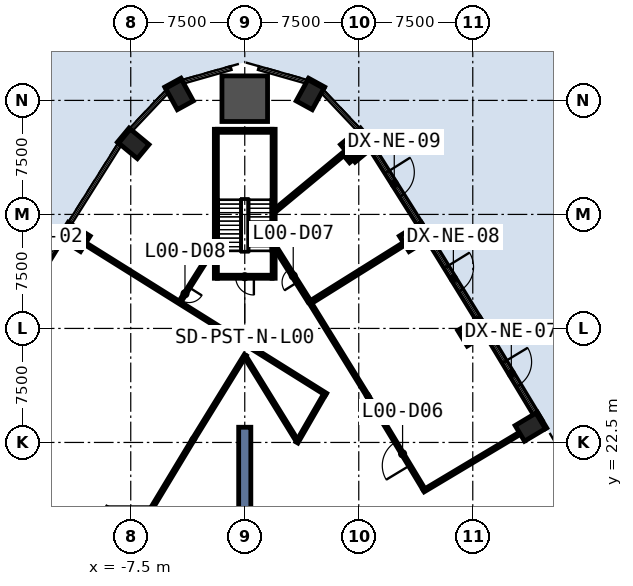
"""IFC4 building model, lengths in metres.
Left out: names, types, materials, properties, quantities, classifications, styles, units other than length and angle.
Written with IfcOpenShell. Run it as: python <this file> out.ifc"""

import sys

from ifc_helpers import new_model, si_unit, direction, frame, frame_2d, origin, origin_2d, place, context, subcontext, project, spatial, rectangle, extrude, element, fill, save


model = new_model("IFC4")
c1 = context("Model", 3, precision=1e-05, world=origin(), true_north=direction((0.0, 1.0)))
c2 = subcontext(c1, "Body", "Model", "MODEL_VIEW")
j1 = project(units=[si_unit("LENGTHUNIT", "METRE"), si_unit("PLANEANGLEUNIT", "RADIAN")], contexts=[c1])
p1 = place(None, origin())
s1 = spatial("IfcSite", under=j1, at=p1, CompositionType="ELEMENT")
p2 = place(p1, origin())
s2 = spatial("IfcBuilding", under=s1, at=p2, CompositionType="ELEMENT")
p3 = place(p2, origin())
s3 = spatial("IfcBuildingStorey", under=s2, at=p3, CompositionType="ELEMENT", Elevation=0.0)
for number, where, z_axis, x_axis in (
    (1, (18.782, 23.508, -0.5), (0.0, 0.0, 1.0), (-0.513, 0.858, 0.0)),
    (2, (15.005, 29.769, -0.5), (0.0, 0.0, 1.0), (-0.522, 0.853, 0.0)),
    (3, (11.167, 35.993, -0.5), (0.0, 0.0, 1.0), (-0.53, 0.848, 0.0)),
    (4, (7.299, 42.144, -0.5), (0.0, 0.0, 1.0), (-0.638, 0.77, 0.0)),
    (5, (4.297, 45.38, -0.5), (0.0, 0.0, 1.0), (-0.877, 0.48, 0.0)),
):
    element("IfcColumn", number, at=place(p3, frame(where, z_axis=z_axis, x_axis=x_axis)), inside=s3, PredefinedType="COLUMN", context=c2, shape_type="SweptSolid", body=[
        extrude(rectangle(XDim=1.2, YDim=1.6, at=origin_2d()), origin(), (0.0, 0.0, 1.0), 9.05),
    ])
p4 = place(p3, frame((0.0, 45.112, -0.5), z_axis=(0.0, 0.0, 1.0), x_axis=(0.0, 1.0, 0.0)))
e6 = element("IfcColumn", 6, at=p4, inside=s3, PredefinedType="COLUMN", context=c2, shape_type="SweptSolid", body=[
    extrude(rectangle(XDim=3.0, YDim=3.0, at=origin_2d()), origin(), (0.0, 0.0, 1.0), 9.05),
])
for number, where, z_axis, x_axis in (
    (7, (-4.297, 45.38, -0.5), (0.0, 0.0, 1.0), (0.877, 0.48, 0.0)),
    (8, (-7.299, 42.144, -0.5), (0.0, 0.0, 1.0), (0.638, 0.77, 0.0)),
    (9, (-11.167, 35.993, -0.5), (0.0, 0.0, 1.0), (0.53, 0.848, 0.0)),
):
    element("IfcColumn", number, at=place(p3, frame(where, z_axis=z_axis, x_axis=x_axis)), inside=s3, PredefinedType="COLUMN", context=c2, shape_type="SweptSolid", body=[
        extrude(rectangle(XDim=1.2, YDim=1.6, at=origin_2d()), origin(), (0.0, 0.0, 1.0), 9.05),
    ])
p5 = place(p3, frame((0.0, 14.5, -0.5), z_axis=(0.0, 0.0, 1.0), x_axis=(0.0, 1.0, 0.0)))
e10 = element("IfcWall", 10, at=p5, inside=s3, PredefinedType="SHEAR", context=c2, shape_type="SweptSolid", body=[
    extrude(rectangle(XDim=9.0, YDim=0.8, at=frame_2d((4.5, 0.0))), origin(), (0.0, 0.0, 1.0), 9.05),
])
for number, where, z_axis, x_axis in (
    (11, (5.231, 45.837, 0.0), (0.0, 0.0, 1.0), (-0.877, 0.48, 0.0)),
    (12, (-4.179, 46.413, 0.0), (0.0, 0.0, 1.0), (-0.877, -0.48, 0.0)),
):
    element("IfcWall", number, at=place(p3, frame(where, z_axis=z_axis, x_axis=x_axis)), inside=s3, PredefinedType="STANDARD", context=c2, shape_type="SweptSolid", body=[
        extrude(rectangle(XDim=1.199, YDim=0.1, at=frame_2d((0.6, 0.0))), origin(), (0.0, 0.0, 1.0), 8.55),
    ])
p6 = place(p3, frame((19.82, 23.429, 0.0), z_axis=(0.0, 0.0, 1.0), x_axis=(-0.513238760752, 0.858245870635, 0.0)))
e13 = element("IfcWall", 13, at=p6, inside=s3, PredefinedType="STANDARD", context=c2, shape_type="SweptSolid", body=[
    extrude(rectangle(XDim=1.2, YDim=0.1, at=frame_2d((0.6, 0.0))), origin(), (0.0, 0.0, 1.0), 8.55),
])
p7 = place(p3, frame((16.043, 29.7, 0.0), z_axis=(0.0, 0.0, 1.0), x_axis=(-0.521507599072, 0.853246637327, 0.0)))
e14 = element("IfcWall", 14, at=p7, inside=s3, PredefinedType="STANDARD", context=c2, shape_type="SweptSolid", body=[
    extrude(rectangle(XDim=1.2, YDim=0.1, at=frame_2d((0.6, 0.0))), origin(), (0.0, 0.0, 1.0), 8.55),
])
for number, where, z_axis, x_axis in (
    (15, (12.206, 35.935, 0.0), (0.0, 0.0, 1.0), (-0.53, 0.848, 0.0)),
    (16, (8.336, 42.224, 0.0), (0.0, 0.0, 1.0), (-0.638, 0.77, 0.0)),
    (17, (-7.571, 43.148, 0.0), (0.0, 0.0, 1.0), (-0.638, -0.77, 0.0)),
    (18, (-11.57, 36.952, 0.0), (0.0, 0.0, 1.0), (-0.53, -0.848, 0.0)),
):
    element("IfcWall", number, at=place(p3, frame(where, z_axis=z_axis, x_axis=x_axis)), inside=s3, PredefinedType="STANDARD", context=c2, shape_type="SweptSolid", body=[
        extrude(rectangle(XDim=1.199, YDim=0.1, at=frame_2d((0.6, 0.0))), origin(), (0.0, 0.0, 1.0), 8.55),
    ])
p8 = place(p3, frame((15.644, 30.161, 0.0), z_axis=(0.0, 0.0, 1.0), x_axis=(0.516671289426, -0.856183846311, 0.0)))
e19 = element("IfcWall", 19, at=p8, inside=s3, PredefinedType="STANDARD", context=c2, shape_type="SweptSolid", body=[
    extrude(rectangle(XDim=7.322, YDim=0.3, at=frame_2d((3.661, 0.0))), origin(), (0.0, 0.0, 1.0), 3.0),
])
p9 = place(p8, frame((2.761, 0.0, 0.0)))
e20 = element("IfcOpeningElement", 20, at=p9, cuts=e19, PredefinedType="OPENING", context=c2, shape_type="SweptSolid", body=[
    extrude(rectangle(XDim=1.8, YDim=2.4, at=frame_2d((0.9, 1.2))), frame((0.0, 0.16, 0.0), z_axis=(0.0, -1.0, 0.0), x_axis=(1.0, 0.0, 0.0)), (0.0, 0.0, 1.0), 0.32),
])
p10 = place(p3, frame((11.802, 36.392, 0.0), z_axis=(0.0, 0.0, 1.0), x_axis=(0.524850464149, -0.851194449161, 0.0)))
e21 = element("IfcWall", 21, at=p10, inside=s3, PredefinedType="STANDARD", context=c2, shape_type="SweptSolid", body=[
    extrude(rectangle(XDim=7.324, YDim=0.3, at=frame_2d((3.662, 0.0))), origin(), (0.0, 0.0, 1.0), 3.0),
])
p11 = place(p10, frame((2.762, 0.0, 0.0)))
e22 = element("IfcOpeningElement", 22, at=p11, cuts=e21, PredefinedType="OPENING", context=c2, shape_type="SweptSolid", body=[
    extrude(rectangle(XDim=1.8, YDim=2.4, at=frame_2d((0.9, 1.2))), frame((0.0, 0.16, 0.0), z_axis=(0.0, -1.0, 0.0), x_axis=(1.0, 0.0, 0.0)), (0.0, 0.0, 1.0), 0.32),
])
p12 = place(p3, frame((7.865, 42.639, 0.0), z_axis=(0.0, 0.0, 1.0), x_axis=(0.533179592981, -0.846002081338, 0.0)))
e23 = element("IfcWall", 23, at=p12, inside=s3, PredefinedType="STANDARD", context=c2, shape_type="SweptSolid", body=[
    extrude(rectangle(XDim=7.388, YDim=0.3, at=frame_2d((3.694, 0.0))), origin(), (0.0, 0.0, 1.0), 3.0),
])
p13 = place(p12, frame((2.794, 0.0, 0.0)))
e24 = element("IfcOpeningElement", 24, at=p13, cuts=e23, PredefinedType="OPENING", context=c2, shape_type="SweptSolid", body=[
    extrude(rectangle(XDim=1.8, YDim=2.4, at=frame_2d((0.9, 1.2))), frame((0.0, 0.16, 0.0), z_axis=(0.0, -1.0, 0.0), x_axis=(1.0, 0.0, 0.0)), (0.0, 0.0, 1.0), 0.32),
])
p14 = place(p3, frame((-15.646, 30.158, 0.0), z_axis=(0.0, 0.0, 1.0), x_axis=(0.524850464149, 0.851194449161, 0.0)))
e25 = element("IfcWall", 25, at=p14, inside=s3, PredefinedType="STANDARD", context=c2, shape_type="SweptSolid", body=[
    extrude(rectangle(XDim=7.324, YDim=0.3, at=frame_2d((3.662, 0.0))), origin(), (0.0, 0.0, 1.0), 3.0),
])
p15 = place(p14, frame((2.762, 0.0, 0.0)))
e26 = element("IfcOpeningElement", 26, at=p15, cuts=e25, PredefinedType="OPENING", context=c2, shape_type="SweptSolid", body=[
    extrude(rectangle(XDim=1.8, YDim=2.4, at=frame_2d((0.9, 1.2))), frame((0.0, 0.16, 0.0), z_axis=(0.0, -1.0, 0.0), x_axis=(1.0, 0.0, 0.0)), (0.0, 0.0, 1.0), 0.32),
])
p16 = place(p3, frame((-10.471, 35.559, 0.0), z_axis=(0.0, 0.0, 1.0), x_axis=(0.847926242488, -0.530114220994, 0.0)))
e27 = element("IfcWall", 27, at=p16, inside=s3, PredefinedType="PARTITIONING", context=c2, shape_type="SweptSolid", body=[
    extrude(rectangle(XDim=18.655, YDim=0.15, at=frame_2d((9.327, 0.0))), origin(), (0.0, 0.0, 1.0), 8.55),
])
p17 = place(p3, frame((5.246, 25.645, 0.0), z_axis=(0.0, 0.0, 1.0), x_axis=(-0.499761246595, -0.866163204253, 0.0)))
e28 = element("IfcWall", 28, at=p17, inside=s3, PredefinedType="PARTITIONING", context=c2, shape_type="SweptSolid", body=[
    extrude(rectangle(XDim=3.632, YDim=0.15, at=frame_2d((1.816, 0.0))), origin(), (0.0, 0.0, 1.0), 8.55),
])
p18 = place(p3, frame((3.394, 22.687, 0.0), z_axis=(0.0, 0.0, 1.0), x_axis=(-0.524928369559, 0.851146407401, 0.0)))
e29 = element("IfcWall", 29, at=p18, inside=s3, PredefinedType="PARTITIONING", context=c2, shape_type="SweptSolid", body=[
    extrude(rectangle(XDim=6.391, YDim=0.15, at=frame_2d((3.196, 0.0))), origin(), (0.0, 0.0, 1.0), 8.55),
])
p19 = place(p3, frame((0.039, 28.255, 0.0), z_axis=(0.0, 0.0, 1.0), x_axis=(-0.524842733288, -0.851199215998, 0.0)))
e30 = element("IfcWall", 30, at=p19, inside=s3, PredefinedType="PARTITIONING", context=c2, shape_type="SweptSolid", body=[
    extrude(rectangle(XDim=6.541, YDim=0.15, at=frame_2d((3.271, 0.0))), origin(), (0.0, 0.0, 1.0), 8.55),
])
p20 = place(p3, frame((-3.394, 22.687, 0.0), z_axis=(0.0, 0.0, 1.0), x_axis=(-0.516736893328, -0.856144253659, 0.0)))
e31 = element("IfcWall", 31, at=p20, inside=s3, PredefinedType="PARTITIONING", context=c2, shape_type="SweptSolid", body=[
    extrude(rectangle(XDim=5.363, YDim=0.15, at=frame_2d((2.681, 0.0))), origin(), (0.0, 0.0, 1.0), 8.55),
])
p21 = place(p3, frame((4.277, 31.686, 0.0), z_axis=(0.0, 0.0, 1.0), x_axis=(0.84795274353, 0.530071829793, 0.0)))
e32 = element("IfcWall", 32, at=p21, inside=s3, PredefinedType="PARTITIONING", context=c2, shape_type="SweptSolid", body=[
    extrude(rectangle(XDim=7.226, YDim=0.2, at=frame_2d((3.613, 0.0))), origin(), (0.0, 0.0, 1.0), 8.55),
])
p22 = place(p3, frame((18.078, 23.088, 0.0), z_axis=(0.0, 0.0, 1.0), x_axis=(-0.858382075275, -0.513010928583, 0.0)))
e33 = element("IfcWall", 33, at=p22, inside=s3, PredefinedType="PARTITIONING", context=c2, shape_type="SweptSolid", body=[
    extrude(rectangle(XDim=7.354, YDim=0.15, at=frame_2d((3.677, 0.0))), origin(), (0.0, 0.0, 1.0), 8.55),
])
p23 = place(p3, frame((11.788, 19.421, 0.0), z_axis=(0.0, 0.0, 1.0), x_axis=(-0.516540400452, 0.856262818707, 0.0)))
e34 = element("IfcWall", 34, at=p23, inside=s3, PredefinedType="PARTITIONING", context=c2, shape_type="SweptSolid", body=[
    extrude(rectangle(XDim=7.159, YDim=0.15, at=frame_2d((3.58, 0.0))), origin(), (0.0, 0.0, 1.0), 8.55),
])
p24 = place(p23, frame((1.821, 0.0, 0.0)))
e35 = element("IfcOpeningElement", 35, at=p24, cuts=e34, PredefinedType="OPENING", context=c2, shape_type="SweptSolid", body=[
    extrude(rectangle(XDim=1.8, YDim=2.1, at=frame_2d((0.9, 1.05))), frame((0.0, 0.085, 0.0), z_axis=(0.0, -1.0, 0.0), x_axis=(1.0, 0.0, 0.0)), (0.0, 0.0, 1.0), 0.17),
])
p25 = place(p3, frame((8.09, 25.551, 0.0), z_axis=(0.0, 0.0, 1.0), x_axis=(-0.524924933436, 0.851148526555, 0.0)))
e36 = element("IfcWall", 36, at=p25, inside=s3, PredefinedType="PARTITIONING", context=c2, shape_type="SweptSolid", body=[
    extrude(rectangle(XDim=7.323, YDim=0.15, at=frame_2d((3.662, 0.0))), origin(), (0.0, 0.0, 1.0), 8.55),
])
p26 = place(p3, frame((2.0, 37.758, 0.0), z_axis=(0.0, 0.0, 1.0), x_axis=(0.7702988792, 0.637683022122, 0.0)))
e37 = element("IfcWall", 37, at=p26, inside=s3, PredefinedType="PARTITIONING", context=c2, shape_type="SweptSolid", body=[
    extrude(rectangle(XDim=5.979, YDim=0.2, at=frame_2d((2.99, 0.0))), origin(), (0.0, 0.0, 1.0), 8.55),
])
p27 = place(p3, frame((6.593, 41.43, 0.0), z_axis=(0.0, 0.0, 1.0), x_axis=(0.636576557089, -0.771213515808, 0.0)))
e38 = element("IfcWall", 38, at=p27, inside=s3, PredefinedType="PARTITIONING", context=c2, shape_type="SweptSolid", body=[
    extrude(rectangle(XDim=0.6, YDim=0.2, at=frame_2d((0.3, 0.0))), origin(), (0.0, 0.0, 1.0), 8.55),
])
p28 = place(p3, frame((7.193, 41.018, 0.0), z_axis=(0.0, 0.0, 1.0), x_axis=(0.77046149962, 0.637486531311, 0.0)))
e39 = element("IfcWall", 39, at=p28, inside=s3, PredefinedType="PARTITIONING", context=c2, shape_type="SweptSolid", body=[
    extrude(rectangle(XDim=1.292, YDim=0.2, at=frame_2d((0.646, 0.0))), origin(), (0.0, 0.0, 1.0), 8.55),
])
p29 = place(p3, frame((4.245, 31.784, 0.0), z_axis=(0.0, 0.0, 1.0), x_axis=(-0.53321613186, 0.845979052178, 0.0)))
e40 = element("IfcWall", 40, at=p29, inside=s3, PredefinedType="PARTITIONING", context=c2, shape_type="SweptSolid", body=[
    extrude(rectangle(XDim=4.21, YDim=0.2, at=frame_2d((2.105, 0.0))), origin(), (0.0, 0.0, 1.0), 8.55),
])
p30 = place(p29, frame((1.481, 0.0, 0.0)))
e41 = element("IfcOpeningElement", 41, at=p30, cuts=e40, PredefinedType="OPENING", context=c2, shape_type="SweptSolid", body=[
    extrude(rectangle(XDim=1.0, YDim=2.1, at=frame_2d((0.5, 1.05))), frame((0.0, 0.11, 0.0), z_axis=(0.0, -1.0, 0.0), x_axis=(1.0, 0.0, 0.0)), (0.0, 0.0, 1.0), 0.22),
])
p31 = place(p3, frame((-2.0, 35.346, 0.0), z_axis=(0.0, 0.0, 1.0), x_axis=(-0.533158009265, -0.846015683753, 0.0)))
e42 = element("IfcWall", 42, at=p31, inside=s3, PredefinedType="PARTITIONING", context=c2, shape_type="SweptSolid", body=[
    extrude(rectangle(XDim=4.226, YDim=0.15, at=frame_2d((2.113, 0.0))), origin(), (0.0, 0.0, 1.0), 8.55),
])
p32 = place(p31, frame((3.125, 0.0, 0.0)))
e43 = element("IfcOpeningElement", 43, at=p32, cuts=e42, PredefinedType="OPENING", context=c2, shape_type="SweptSolid", body=[
    extrude(rectangle(XDim=1.0, YDim=2.1, at=frame_2d((0.5, 1.05))), frame((0.0, 0.085, 0.0), z_axis=(0.0, -1.0, 0.0), x_axis=(1.0, 0.0, 0.0)), (0.0, 0.0, 1.0), 0.17),
])
for number, where, z_axis, x_axis in (
    (44, (1.9, 33.3, 0.0), (0.0, 0.0, 1.0), (0.0, 1.0, 0.0)),
    (45, (-1.9, 33.3, 0.0), (0.0, 0.0, 1.0), (0.0, 1.0, 0.0)),
):
    element("IfcWall", number, at=place(p3, frame(where, z_axis=z_axis, x_axis=x_axis)), inside=s3, PredefinedType="STANDARD", context=c2, shape_type="SweptSolid", body=[
        extrude(rectangle(XDim=9.8, YDim=0.2, at=frame_2d((4.9, 0.0))), origin(), (0.0, 0.0, 1.0), 8.55),
    ])
p33 = place(p3, frame((1.8, 33.4, 0.0), z_axis=(0.0, 0.0, 1.0), x_axis=(-1.0, 0.0, 0.0)))
e46 = element("IfcWall", 46, at=p33, inside=s3, PredefinedType="STANDARD", context=c2, shape_type="SweptSolid", body=[
    extrude(rectangle(XDim=3.6, YDim=0.2, at=frame_2d((1.8, 0.0))), origin(), (0.0, 0.0, 1.0), 8.55),
])
p34 = place(p33, frame((1.2, 0.0, 0.0)))
e47 = element("IfcOpeningElement", 47, at=p34, cuts=e46, PredefinedType="OPENING", context=c2, shape_type="SweptSolid", body=[
    extrude(rectangle(XDim=1.2, YDim=2.2, at=frame_2d((0.6, 1.1))), frame((0.0, 0.11, 0.0), z_axis=(0.0, -1.0, 0.0), x_axis=(1.0, 0.0, 0.0)), (0.0, 0.0, 1.0), 0.22),
])
p35 = place(p3, frame((1.8, 43.0, 0.0), z_axis=(0.0, 0.0, 1.0), x_axis=(-1.0, 0.0, 0.0)))
e48 = element("IfcWall", 48, at=p35, inside=s3, PredefinedType="STANDARD", context=c2, shape_type="SweptSolid", body=[
    extrude(rectangle(XDim=3.6, YDim=0.2, at=frame_2d((1.8, 0.0))), origin(), (0.0, 0.0, 1.0), 8.55),
])
p36 = place(p9, origin())
e49 = element("IfcDoor", 49, at=p36, inside=s3, OperationType="DOUBLE_DOOR_SINGLE_SWING", PredefinedType="DOOR", context=c2, shape_type="SweptSolid", body=[
    extrude(rectangle(XDim=1.8, YDim=2.4, at=frame_2d((0.9, 1.2))), frame((0.0, 0.025, 0.0), z_axis=(0.0, -1.0, 0.0), x_axis=(1.0, 0.0, 0.0)), (0.0, 0.0, 1.0), 0.05),
])
fill(e20, e49)
p37 = place(p11, origin())
e50 = element("IfcDoor", 50, at=p37, inside=s3, OperationType="DOUBLE_DOOR_SINGLE_SWING", PredefinedType="DOOR", context=c2, shape_type="SweptSolid", body=[
    extrude(rectangle(XDim=1.8, YDim=2.4, at=frame_2d((0.9, 1.2))), frame((0.0, 0.025, 0.0), z_axis=(0.0, -1.0, 0.0), x_axis=(1.0, 0.0, 0.0)), (0.0, 0.0, 1.0), 0.05),
])
fill(e22, e50)
p38 = place(p13, origin())
e51 = element("IfcDoor", 51, at=p38, inside=s3, OperationType="DOUBLE_DOOR_SINGLE_SWING", PredefinedType="DOOR", context=c2, shape_type="SweptSolid", body=[
    extrude(rectangle(XDim=1.8, YDim=2.4, at=frame_2d((0.9, 1.2))), frame((0.0, 0.025, 0.0), z_axis=(0.0, -1.0, 0.0), x_axis=(1.0, 0.0, 0.0)), (0.0, 0.0, 1.0), 0.05),
])
fill(e24, e51)
p39 = place(p24, origin())
e52 = element("IfcDoor", 52, at=p39, inside=s3, OperationType="DOUBLE_DOOR_SINGLE_SWING", PredefinedType="DOOR", context=c2, shape_type="SweptSolid", body=[
    extrude(rectangle(XDim=1.8, YDim=2.1, at=frame_2d((0.9, 1.05))), frame((0.0, 0.025, 0.0), z_axis=(0.0, -1.0, 0.0), x_axis=(1.0, 0.0, 0.0)), (0.0, 0.0, 1.0), 0.05),
])
fill(e35, e52)
p40 = place(p30, origin())
e53 = element("IfcDoor", 53, at=p40, inside=s3, OperationType="SINGLE_SWING_LEFT", PredefinedType="DOOR", context=c2, shape_type="SweptSolid", body=[
    extrude(rectangle(XDim=1.0, YDim=2.1, at=frame_2d((0.5, 1.05))), frame((0.0, 0.025, 0.0), z_axis=(0.0, -1.0, 0.0), x_axis=(1.0, 0.0, 0.0)), (0.0, 0.0, 1.0), 0.05),
])
fill(e41, e53)
p41 = place(p32, origin())
e54 = element("IfcDoor", 54, at=p41, inside=s3, OperationType="SINGLE_SWING_RIGHT", PredefinedType="DOOR", context=c2, shape_type="SweptSolid", body=[
    extrude(rectangle(XDim=1.0, YDim=2.1, at=frame_2d((0.5, 1.05))), frame((0.0, 0.025, 0.0), z_axis=(0.0, -1.0, 0.0), x_axis=(1.0, 0.0, 0.0)), (0.0, 0.0, 1.0), 0.05),
])
fill(e43, e54)
p42 = place(p34, origin())
e55 = element("IfcDoor", 55, at=p42, inside=s3, OperationType="SINGLE_SWING_LEFT", PredefinedType="DOOR", context=c2, shape_type="SweptSolid", body=[
    extrude(rectangle(XDim=1.2, YDim=2.2, at=frame_2d((0.6, 1.1))), frame((0.0, 0.025, 0.0), z_axis=(0.0, -1.0, 0.0), x_axis=(1.0, 0.0, 0.0)), (0.0, 0.0, 1.0), 0.05),
])
fill(e47, e55)
save(model, sys.argv[1])
